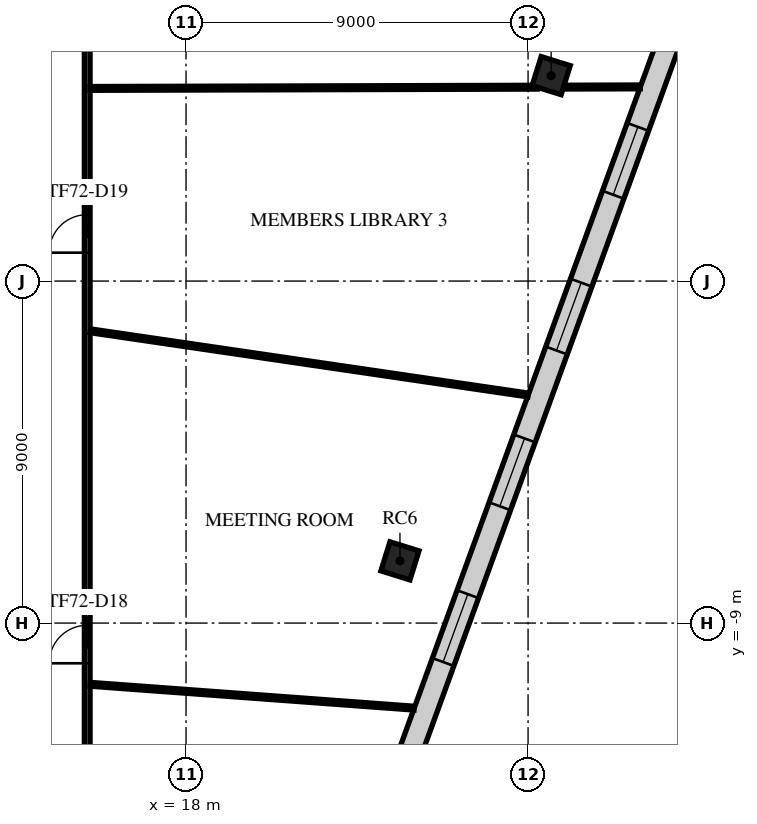
"""IFC4 building model, lengths in metres.
Left out: names, types, materials, properties, quantities, classifications, styles, units other than length and angle.
Written with IfcOpenShell. Run it as: python <this file> out.ifc"""

import sys

from ifc_helpers import new_model, si_unit, direction, frame, frame_2d, origin, origin_2d, place, context, subcontext, project, spatial, rectangle, extrude, element, fill, save


model = new_model("IFC4")
c1 = context("Model", 3, precision=1e-05, world=origin(), true_north=direction((0.0, 1.0)))
c2 = subcontext(c1, "Body", "Model", "MODEL_VIEW")
j1 = project(units=[si_unit("LENGTHUNIT", "METRE"), si_unit("PLANEANGLEUNIT", "RADIAN")], contexts=[c1])
p1 = place(None, origin())
s1 = spatial("IfcSite", under=j1, at=p1, CompositionType="ELEMENT")
p2 = place(p1, origin())
s2 = spatial("IfcBuilding", under=s1, at=p2, CompositionType="ELEMENT")
p3 = place(p2, frame((0.0, 0.0, 304.5)))
s3 = spatial("IfcBuildingStorey", under=s2, at=p3, CompositionType="ELEMENT", Elevation=304.5)
for number, where, z_axis, x_axis in (
    (1, (23.629, -7.363, 0.0), (0.0, 0.0, 1.0), (0.298, 0.955, 0.0)),
    (2, (27.608, 5.406, 0.0), (0.0, 0.0, 1.0), (0.298, 0.955, 0.0)),
):
    element("IfcColumn", number, at=place(p3, frame(where, z_axis=z_axis, x_axis=x_axis)), inside=s3, PredefinedType="COLUMN", context=c2, shape_type="SweptSolid", body=[
        extrude(rectangle(XDim=0.8, YDim=0.8, at=origin_2d()), origin(), (0.0, 0.0, 1.0), 4.0),
    ])
p4 = place(p3, frame((16.885, -31.675, 0.0), z_axis=(0.0, 0.0, 1.0), x_axis=(0.342016786282, 0.939693842643, 0.0)))
e3 = element("IfcWall", 3, at=p4, inside=s3, PredefinedType="STANDARD", context=c2, shape_type="SweptSolid", body=[
    extrude(rectangle(XDim=47.979, YDim=0.6, at=frame_2d((23.99, 0.0))), origin(), (0.0, 0.0, 1.0), 3.65),
])
p5 = place(p4, frame((1.231, 0.0, 0.9)))
e4 = element("IfcOpeningElement", 4, at=p5, cuts=e3, PredefinedType="OPENING", context=c2, shape_type="SweptSolid", body=[
    extrude(rectangle(XDim=1.9, YDim=2.1, at=frame_2d((0.95, 1.05))), frame((0.0, 0.31, 0.0), z_axis=(0.0, -1.0, 0.0), x_axis=(1.0, 0.0, 0.0)), (0.0, 0.0, 1.0), 0.62),
])
p6 = place(p4, frame((5.593, 0.0, 0.9)))
e5 = element("IfcOpeningElement", 5, at=p6, cuts=e3, PredefinedType="OPENING", context=c2, shape_type="SweptSolid", body=[
    extrude(rectangle(XDim=1.9, YDim=2.1, at=frame_2d((0.95, 1.05))), frame((0.0, 0.31, 0.0), z_axis=(0.0, -1.0, 0.0), x_axis=(1.0, 0.0, 0.0)), (0.0, 0.0, 1.0), 0.62),
])
p7 = place(p4, frame((9.954, 0.0, 0.9)))
e6 = element("IfcOpeningElement", 6, at=p7, cuts=e3, PredefinedType="OPENING", context=c2, shape_type="SweptSolid", body=[
    extrude(rectangle(XDim=1.9, YDim=2.1, at=frame_2d((0.95, 1.05))), frame((0.0, 0.31, 0.0), z_axis=(0.0, -1.0, 0.0), x_axis=(1.0, 0.0, 0.0)), (0.0, 0.0, 1.0), 0.62),
])
p8 = place(p4, frame((14.316, 0.0, 0.9)))
e7 = element("IfcOpeningElement", 7, at=p8, cuts=e3, PredefinedType="OPENING", context=c2, shape_type="SweptSolid", body=[
    extrude(rectangle(XDim=1.9, YDim=2.1, at=frame_2d((0.95, 1.05))), frame((0.0, 0.31, 0.0), z_axis=(0.0, -1.0, 0.0), x_axis=(1.0, 0.0, 0.0)), (0.0, 0.0, 1.0), 0.62),
])
p9 = place(p4, frame((18.678, 0.0, 0.9)))
e8 = element("IfcOpeningElement", 8, at=p9, cuts=e3, PredefinedType="OPENING", context=c2, shape_type="SweptSolid", body=[
    extrude(rectangle(XDim=1.9, YDim=2.1, at=frame_2d((0.95, 1.05))), frame((0.0, 0.31, 0.0), z_axis=(0.0, -1.0, 0.0), x_axis=(1.0, 0.0, 0.0)), (0.0, 0.0, 1.0), 0.62),
])
p10 = place(p4, frame((23.04, 0.0, 0.9)))
e9 = element("IfcOpeningElement", 9, at=p10, cuts=e3, PredefinedType="OPENING", context=c2, shape_type="SweptSolid", body=[
    extrude(rectangle(XDim=1.9, YDim=2.1, at=frame_2d((0.95, 1.05))), frame((0.0, 0.31, 0.0), z_axis=(0.0, -1.0, 0.0), x_axis=(1.0, 0.0, 0.0)), (0.0, 0.0, 1.0), 0.62),
])
p11 = place(p4, frame((27.401, 0.0, 0.9)))
e10 = element("IfcOpeningElement", 10, at=p11, cuts=e3, PredefinedType="OPENING", context=c2, shape_type="SweptSolid", body=[
    extrude(rectangle(XDim=1.9, YDim=2.1, at=frame_2d((0.95, 1.05))), frame((0.0, 0.31, 0.0), z_axis=(0.0, -1.0, 0.0), x_axis=(1.0, 0.0, 0.0)), (0.0, 0.0, 1.0), 0.62),
])
p12 = place(p4, frame((31.763, 0.0, 0.9)))
e11 = element("IfcOpeningElement", 11, at=p12, cuts=e3, PredefinedType="OPENING", context=c2, shape_type="SweptSolid", body=[
    extrude(rectangle(XDim=1.9, YDim=2.1, at=frame_2d((0.95, 1.05))), frame((0.0, 0.31, 0.0), z_axis=(0.0, -1.0, 0.0), x_axis=(1.0, 0.0, 0.0)), (0.0, 0.0, 1.0), 0.62),
])
p13 = place(p4, frame((36.125, 0.0, 0.9)))
e12 = element("IfcOpeningElement", 12, at=p13, cuts=e3, PredefinedType="OPENING", context=c2, shape_type="SweptSolid", body=[
    extrude(rectangle(XDim=1.9, YDim=2.1, at=frame_2d((0.95, 1.05))), frame((0.0, 0.31, 0.0), z_axis=(0.0, -1.0, 0.0), x_axis=(1.0, 0.0, 0.0)), (0.0, 0.0, 1.0), 0.62),
])
p14 = place(p4, frame((40.487, 0.0, 0.9)))
e13 = element("IfcOpeningElement", 13, at=p14, cuts=e3, PredefinedType="OPENING", context=c2, shape_type="SweptSolid", body=[
    extrude(rectangle(XDim=1.9, YDim=2.1, at=frame_2d((0.95, 1.05))), frame((0.0, 0.31, 0.0), z_axis=(0.0, -1.0, 0.0), x_axis=(1.0, 0.0, 0.0)), (0.0, 0.0, 1.0), 0.62),
])
p15 = place(p4, frame((44.848, 0.0, 0.9)))
e14 = element("IfcOpeningElement", 14, at=p15, cuts=e3, PredefinedType="OPENING", context=c2, shape_type="SweptSolid", body=[
    extrude(rectangle(XDim=1.9, YDim=2.1, at=frame_2d((0.95, 1.05))), frame((0.0, 0.31, 0.0), z_axis=(0.0, -1.0, 0.0), x_axis=(1.0, 0.0, 0.0)), (0.0, 0.0, 1.0), 0.62),
])
p16 = place(p3, frame((15.4, -15.325, 0.0), z_axis=(0.0, 0.0, 1.0), x_axis=(0.0, 1.0, 0.0)))
e15 = element("IfcWall", 15, at=p16, inside=s3, PredefinedType="PARTITIONING", context=c2, shape_type="SweptSolid", body=[
    extrude(rectangle(XDim=27.593, YDim=0.15, at=frame_2d((13.796, 0.0))), origin(), (0.0, 0.0, 1.0), 3.25),
])
p17 = place(p16, frame((5.267, 0.0, 0.0)))
e16 = element("IfcOpeningElement", 16, at=p17, cuts=e15, PredefinedType="OPENING", context=c2, shape_type="SweptSolid", body=[
    extrude(rectangle(XDim=1.0, YDim=2.1, at=frame_2d((0.5, 1.05))), frame((0.0, 0.085, 0.0), z_axis=(0.0, -1.0, 0.0), x_axis=(1.0, 0.0, 0.0)), (0.0, 0.0, 1.0), 0.17),
])
p18 = place(p16, frame((16.072, 0.0, 0.0)))
e17 = element("IfcOpeningElement", 17, at=p18, cuts=e15, PredefinedType="OPENING", context=c2, shape_type="SweptSolid", body=[
    extrude(rectangle(XDim=1.0, YDim=2.1, at=frame_2d((0.5, 1.05))), frame((0.0, 0.085, 0.0), z_axis=(0.0, -1.0, 0.0), x_axis=(1.0, 0.0, 0.0)), (0.0, 0.0, 1.0), 0.17),
])
p19 = place(p16, frame((21.944, 0.0, 0.0)))
e18 = element("IfcOpeningElement", 18, at=p19, cuts=e15, PredefinedType="OPENING", context=c2, shape_type="SweptSolid", body=[
    extrude(rectangle(XDim=1.8, YDim=2.1, at=frame_2d((0.9, 1.05))), frame((0.0, 0.085, 0.0), z_axis=(0.0, -1.0, 0.0), x_axis=(1.0, 0.0, 0.0)), (0.0, 0.0, 1.0), 0.17),
])
p20 = place(p3, frame((15.479, -10.611, 0.0), z_axis=(0.0, 0.0, 1.0), x_axis=(0.997294736008, -0.073506527135, 0.0)))
e19 = element("IfcWall", 19, at=p20, inside=s3, PredefinedType="PARTITIONING", context=c2, shape_type="SweptSolid", body=[
    extrude(rectangle(XDim=8.546, YDim=0.1, at=frame_2d((4.273, 0.0))), origin(), (0.0, 0.0, 1.0), 3.05),
])
p21 = place(p3, frame((15.482, -1.309, 0.0), z_axis=(0.0, 0.0, 1.0), x_axis=(0.989423142791, -0.145058072884, 0.0)))
e20 = element("IfcWall", 20, at=p21, inside=s3, PredefinedType="PARTITIONING", context=c2, shape_type="SweptSolid", body=[
    extrude(rectangle(XDim=11.642, YDim=0.1, at=frame_2d((5.821, 0.0))), origin(), (0.0, 0.0, 1.0), 3.05),
])
p22 = place(p3, frame((15.475, 5.069, 0.0), z_axis=(0.0, 0.0, 1.0), x_axis=(0.999996133827, 0.00278070684, 0.0)))
e21 = element("IfcWall", 21, at=p22, inside=s3, PredefinedType="PARTITIONING", context=c2, shape_type="SweptSolid", body=[
    extrude(rectangle(XDim=11.765, YDim=0.1, at=frame_2d((5.882, 0.0))), origin(), (0.0, 0.0, 1.0), 3.13),
])
p23 = place(p3, frame((27.933, 5.104, 0.0), z_axis=(0.0, 0.0, 1.0), x_axis=(0.999996132662, 0.002781125883, 0.0)))
e22 = element("IfcWall", 22, at=p23, inside=s3, PredefinedType="PARTITIONING", context=c2, shape_type="SweptSolid", body=[
    extrude(rectangle(XDim=2.019, YDim=0.1, at=frame_2d((1.01, 0.0))), origin(), (0.0, 0.0, 1.0), 3.65),
])
p24 = place(p10, origin())
e23 = element("IfcWindow", 23, at=p24, inside=s3, PartitioningType="SINGLE_PANEL", PredefinedType="WINDOW", context=c2, shape_type="SweptSolid", body=[
    extrude(rectangle(XDim=1.9, YDim=2.1, at=frame_2d((0.95, 1.05))), frame((0.0, 0.03, 0.0), z_axis=(0.0, -1.0, 0.0), x_axis=(1.0, 0.0, 0.0)), (0.0, 0.0, 1.0), 0.06),
])
fill(e9, e23)
p25 = place(p11, origin())
e24 = element("IfcWindow", 24, at=p25, inside=s3, PartitioningType="SINGLE_PANEL", PredefinedType="WINDOW", context=c2, shape_type="SweptSolid", body=[
    extrude(rectangle(XDim=1.9, YDim=2.1, at=frame_2d((0.95, 1.05))), frame((0.0, 0.03, 0.0), z_axis=(0.0, -1.0, 0.0), x_axis=(1.0, 0.0, 0.0)), (0.0, 0.0, 1.0), 0.06),
])
fill(e10, e24)
p26 = place(p12, origin())
e25 = element("IfcWindow", 25, at=p26, inside=s3, PartitioningType="SINGLE_PANEL", PredefinedType="WINDOW", context=c2, shape_type="SweptSolid", body=[
    extrude(rectangle(XDim=1.9, YDim=2.1, at=frame_2d((0.95, 1.05))), frame((0.0, 0.03, 0.0), z_axis=(0.0, -1.0, 0.0), x_axis=(1.0, 0.0, 0.0)), (0.0, 0.0, 1.0), 0.06),
])
fill(e11, e25)
p27 = place(p13, origin())
e26 = element("IfcWindow", 26, at=p27, inside=s3, PartitioningType="SINGLE_PANEL", PredefinedType="WINDOW", context=c2, shape_type="SweptSolid", body=[
    extrude(rectangle(XDim=1.9, YDim=2.1, at=frame_2d((0.95, 1.05))), frame((0.0, 0.03, 0.0), z_axis=(0.0, -1.0, 0.0), x_axis=(1.0, 0.0, 0.0)), (0.0, 0.0, 1.0), 0.06),
])
fill(e12, e26)
p28 = place(p17, frame((1.0, 0.0, 0.0), z_axis=(0.0, 0.0, 1.0), x_axis=(-1.0, 0.0, 0.0)))
e27 = element("IfcDoor", 27, at=p28, inside=s3, OperationType="SINGLE_SWING_RIGHT", PredefinedType="DOOR", context=c2, shape_type="SweptSolid", body=[
    extrude(rectangle(XDim=1.0, YDim=2.1, at=frame_2d((0.5, 1.05))), frame((0.0, 0.025, 0.0), z_axis=(0.0, -1.0, 0.0), x_axis=(1.0, 0.0, 0.0)), (0.0, 0.0, 1.0), 0.05),
])
fill(e16, e27)
p29 = place(p18, frame((1.0, 0.0, 0.0), z_axis=(0.0, 0.0, 1.0), x_axis=(-1.0, 0.0, 0.0)))
e28 = element("IfcDoor", 28, at=p29, inside=s3, OperationType="SINGLE_SWING_RIGHT", PredefinedType="DOOR", context=c2, shape_type="SweptSolid", body=[
    extrude(rectangle(XDim=1.0, YDim=2.1, at=frame_2d((0.5, 1.05))), frame((0.0, 0.025, 0.0), z_axis=(0.0, -1.0, 0.0), x_axis=(1.0, 0.0, 0.0)), (0.0, 0.0, 1.0), 0.05),
])
fill(e17, e28)
save(model, sys.argv[1])
